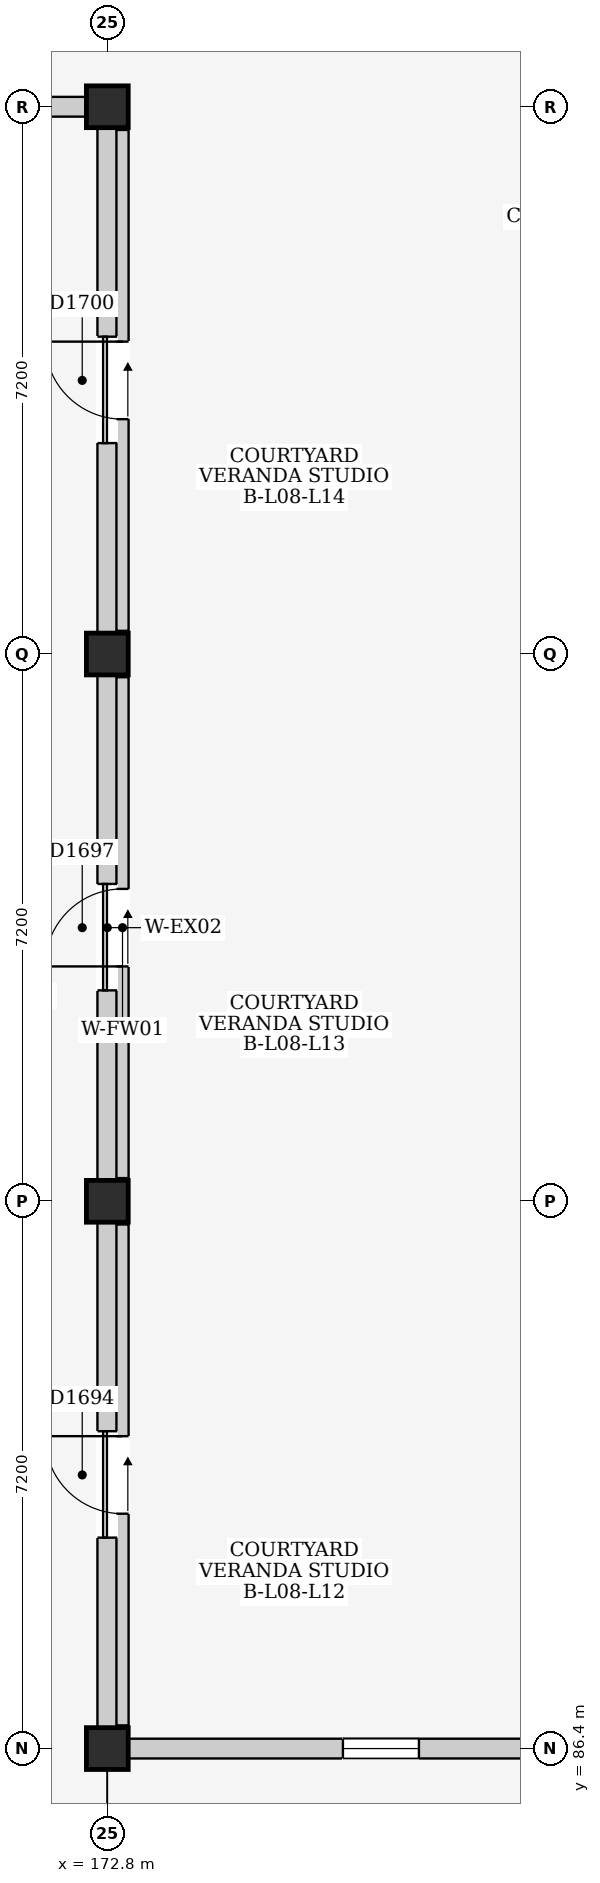
"""IFC4 building model, lengths in metres.
Left out: names, types, materials, properties, quantities, classifications, styles, units other than length and angle.
Written with IfcOpenShell. Run it as: python <this file> out.ifc"""

import sys

from ifc_helpers import new_model, si_unit, direction, frame, frame_2d, origin, origin_2d, place, context, subcontext, project, spatial, rectangle, extrude, element, fill, save


model = new_model("IFC4")
c1 = context("Model", 3, precision=1e-05, world=origin(), true_north=direction((0.0, 1.0)))
c2 = subcontext(c1, "Body", "Model", "MODEL_VIEW")
j1 = project(units=[si_unit("LENGTHUNIT", "METRE"), si_unit("PLANEANGLEUNIT", "RADIAN")], contexts=[c1])
p1 = place(None, origin())
s1 = spatial("IfcSite", under=j1, at=p1, CompositionType="ELEMENT")
p2 = place(p1, origin())
s2 = spatial("IfcBuilding", under=s1, at=p2, CompositionType="ELEMENT")
p3 = place(p2, frame((0.0, 0.0, 28.3)))
s3 = spatial("IfcBuildingStorey", under=s2, at=p3, CompositionType="ELEMENT", Elevation=28.3)
for number, where, z_axis, x_axis in (
    (1, (172.8, 86.4, 0.0), (0.0, 0.0, 1.0), (1.0, 0.0, 0.0)),
    (2, (172.8, 93.6, 0.0), (0.0, 0.0, 1.0), (1.0, 0.0, 0.0)),
    (3, (172.8, 100.8, 0.0), (0.0, 0.0, 1.0), (1.0, 0.0, 0.0)),
    (4, (172.8, 108.0, 0.0), (0.0, 0.0, 1.0), (1.0, 0.0, 0.0)),
):
    element("IfcColumn", number, at=place(p3, frame(where, z_axis=z_axis, x_axis=x_axis)), inside=s3, PredefinedType="COLUMN", context=c2, shape_type="SweptSolid", body=[
        extrude(rectangle(XDim=0.55, YDim=0.55, at=origin_2d()), origin(), (0.0, 0.0, 1.0), 3.2),
    ])
p4 = place(p3, frame((165.875, 108.0, 0.0), z_axis=(0.0, 0.0, 1.0), x_axis=(1.0, 0.0, 0.0)))
e5 = element("IfcWall", 5, at=p4, inside=s3, PredefinedType="ELEMENTEDWALL", context=c2, shape_type="SweptSolid", body=[
    extrude(rectangle(XDim=6.65, YDim=0.26, at=frame_2d((3.325, 0.0))), origin(), (0.0, 0.0, 1.0), 2.335),
])
p5 = place(p4, frame((2.825, 0.0, 1.2)))
e6 = element("IfcOpeningElement", 6, at=p5, cuts=e5, PredefinedType="OPENING", context=c2, shape_type="SweptSolid", body=[
    extrude(rectangle(XDim=1.0, YDim=0.9, at=frame_2d((0.5, 0.45))), frame((0.0, 0.145, 0.0), z_axis=(0.0, -1.0, 0.0), x_axis=(1.0, 0.0, 0.0)), (0.0, 0.0, 1.0), 0.29),
])
p6 = place(p3, frame((173.075, 86.4, 0.0), z_axis=(0.0, 0.0, 1.0), x_axis=(1.0, 0.0, 0.0)))
e7 = element("IfcWall", 7, at=p6, inside=s3, PredefinedType="ELEMENTEDWALL", context=c2, shape_type="SweptSolid", body=[
    extrude(rectangle(XDim=6.65, YDim=0.26, at=frame_2d((3.325, 0.0))), origin(), (0.0, 0.0, 1.0), 2.335),
])
p7 = place(p6, frame((2.825, 0.0, 1.1)))
e8 = element("IfcOpeningElement", 8, at=p7, cuts=e7, PredefinedType="OPENING", context=c2, shape_type="SweptSolid", body=[
    extrude(rectangle(XDim=1.0, YDim=0.9, at=frame_2d((0.5, 0.45))), frame((0.0, 0.145, 0.0), z_axis=(0.0, -1.0, 0.0), x_axis=(1.0, 0.0, 0.0)), (0.0, 0.0, 1.0), 0.29),
])
p8 = place(p3, frame((172.8, 86.675, 0.0), z_axis=(0.0, 0.0, 1.0), x_axis=(0.0, 1.0, 0.0)))
e9 = element("IfcWall", 9, at=p8, inside=s3, PredefinedType="ELEMENTEDWALL", context=c2, shape_type="SweptSolid", body=[
    extrude(rectangle(XDim=6.65, YDim=0.26, at=frame_2d((3.325, 0.0))), origin(), (0.0, 0.0, 1.0), 2.435),
])
p9 = place(p8, frame((2.5, 0.0, 0.0)))
e10 = element("IfcOpeningElement", 10, at=p9, cuts=e9, PredefinedType="OPENING", context=c2, shape_type="SweptSolid", body=[
    extrude(rectangle(XDim=1.4, YDim=2.1, at=frame_2d((0.7, 1.05))), frame((0.0, 0.145, 0.0), z_axis=(0.0, -1.0, 0.0), x_axis=(1.0, 0.0, 0.0)), (0.0, 0.0, 1.0), 0.29),
])
p10 = place(p3, frame((172.8, 93.875, 0.0), z_axis=(0.0, 0.0, 1.0), x_axis=(0.0, 1.0, 0.0)))
e11 = element("IfcWall", 11, at=p10, inside=s3, PredefinedType="ELEMENTEDWALL", context=c2, shape_type="SweptSolid", body=[
    extrude(rectangle(XDim=6.65, YDim=0.26, at=frame_2d((3.325, 0.0))), origin(), (0.0, 0.0, 1.0), 2.435),
])
p11 = place(p10, frame((2.5, 0.0, 0.0)))
e12 = element("IfcOpeningElement", 12, at=p11, cuts=e11, PredefinedType="OPENING", context=c2, shape_type="SweptSolid", body=[
    extrude(rectangle(XDim=1.4, YDim=2.1, at=frame_2d((0.7, 1.05))), frame((0.0, 0.145, 0.0), z_axis=(0.0, -1.0, 0.0), x_axis=(1.0, 0.0, 0.0)), (0.0, 0.0, 1.0), 0.29),
])
p12 = place(p3, frame((172.8, 101.075, 0.0), z_axis=(0.0, 0.0, 1.0), x_axis=(0.0, 1.0, 0.0)))
e13 = element("IfcWall", 13, at=p12, inside=s3, PredefinedType="ELEMENTEDWALL", context=c2, shape_type="SweptSolid", body=[
    extrude(rectangle(XDim=6.65, YDim=0.26, at=frame_2d((3.325, 0.0))), origin(), (0.0, 0.0, 1.0), 2.435),
])
p13 = place(p12, frame((2.5, 0.0, 0.0)))
e14 = element("IfcOpeningElement", 14, at=p13, cuts=e13, PredefinedType="OPENING", context=c2, shape_type="SweptSolid", body=[
    extrude(rectangle(XDim=1.4, YDim=2.1, at=frame_2d((0.7, 1.05))), frame((0.0, 0.145, 0.0), z_axis=(0.0, -1.0, 0.0), x_axis=(1.0, 0.0, 0.0)), (0.0, 0.0, 1.0), 0.29),
])
p14 = place(p3, frame((173.0, 86.705, 0.0), z_axis=(0.0, 0.0, 1.0), x_axis=(0.0, 1.0, 0.0)))
e15 = element("IfcWall", 15, at=p14, inside=s3, PredefinedType="PARTITIONING", context=c2, shape_type="SweptSolid", body=[
    extrude(rectangle(XDim=6.59, YDim=0.16, at=frame_2d((3.295, 0.0))), origin(), (0.0, 0.0, 1.0), 2.95),
])
p15 = place(p14, frame((2.785, 0.0, 0.0)))
e16 = element("IfcOpeningElement", 16, at=p15, cuts=e15, PredefinedType="OPENING", context=c2, shape_type="SweptSolid", body=[
    extrude(rectangle(XDim=1.02, YDim=2.18, at=frame_2d((0.51, 1.09))), frame((0.0, 0.095, 0.0), z_axis=(0.0, -1.0, 0.0), x_axis=(1.0, 0.0, 0.0)), (0.0, 0.0, 1.0), 0.19),
])
p16 = place(p3, frame((173.0, 93.905, 0.0), z_axis=(0.0, 0.0, 1.0), x_axis=(0.0, 1.0, 0.0)))
e17 = element("IfcWall", 17, at=p16, inside=s3, PredefinedType="PARTITIONING", context=c2, shape_type="SweptSolid", body=[
    extrude(rectangle(XDim=6.59, YDim=0.16, at=frame_2d((3.295, 0.0))), origin(), (0.0, 0.0, 1.0), 2.95),
])
p17 = place(p16, frame((2.785, 0.0, 0.0)))
e18 = element("IfcOpeningElement", 18, at=p17, cuts=e17, PredefinedType="OPENING", context=c2, shape_type="SweptSolid", body=[
    extrude(rectangle(XDim=1.02, YDim=2.18, at=frame_2d((0.51, 1.09))), frame((0.0, 0.095, 0.0), z_axis=(0.0, -1.0, 0.0), x_axis=(1.0, 0.0, 0.0)), (0.0, 0.0, 1.0), 0.19),
])
p18 = place(p3, frame((173.0, 101.105, 0.0), z_axis=(0.0, 0.0, 1.0), x_axis=(0.0, 1.0, 0.0)))
e19 = element("IfcWall", 19, at=p18, inside=s3, PredefinedType="PARTITIONING", context=c2, shape_type="SweptSolid", body=[
    extrude(rectangle(XDim=6.59, YDim=0.16, at=frame_2d((3.295, 0.0))), origin(), (0.0, 0.0, 1.0), 2.95),
])
p19 = place(p18, frame((2.785, 0.0, 0.0)))
e20 = element("IfcOpeningElement", 20, at=p19, cuts=e19, PredefinedType="OPENING", context=c2, shape_type="SweptSolid", body=[
    extrude(rectangle(XDim=1.02, YDim=2.18, at=frame_2d((0.51, 1.09))), frame((0.0, 0.095, 0.0), z_axis=(0.0, -1.0, 0.0), x_axis=(1.0, 0.0, 0.0)), (0.0, 0.0, 1.0), 0.19),
])
p20 = place(p7, origin())
e21 = element("IfcWindow", 21, at=p20, inside=s3, PartitioningType="SINGLE_PANEL", PredefinedType="WINDOW", context=c2, shape_type="SweptSolid", body=[
    extrude(rectangle(XDim=1.0, YDim=0.9, at=frame_2d((0.5, 0.45))), frame((0.0, 0.03, 0.0), z_axis=(0.0, -1.0, 0.0), x_axis=(1.0, 0.0, 0.0)), (0.0, 0.0, 1.0), 0.06),
])
fill(e8, e21)
p21 = place(p9, frame((1.4, 0.0, 0.0), z_axis=(0.0, 0.0, 1.0), x_axis=(-1.0, 0.0, 0.0)))
e22 = element("IfcDoor", 22, at=p21, inside=s3, OperationType="SLIDING_TO_RIGHT", PredefinedType="DOOR", context=c2, shape_type="SweptSolid", body=[
    extrude(rectangle(XDim=1.4, YDim=2.1, at=frame_2d((0.7, 1.05))), frame((0.0, 0.025, 0.0), z_axis=(0.0, -1.0, 0.0), x_axis=(1.0, 0.0, 0.0)), (0.0, 0.0, 1.0), 0.05),
])
fill(e10, e22)
p22 = place(p11, frame((1.4, 0.0, 0.0), z_axis=(0.0, 0.0, 1.0), x_axis=(-1.0, 0.0, 0.0)))
e23 = element("IfcDoor", 23, at=p22, inside=s3, OperationType="SLIDING_TO_RIGHT", PredefinedType="DOOR", context=c2, shape_type="SweptSolid", body=[
    extrude(rectangle(XDim=1.4, YDim=2.1, at=frame_2d((0.7, 1.05))), frame((0.0, 0.025, 0.0), z_axis=(0.0, -1.0, 0.0), x_axis=(1.0, 0.0, 0.0)), (0.0, 0.0, 1.0), 0.05),
])
fill(e12, e23)
p23 = place(p13, frame((1.4, 0.0, 0.0), z_axis=(0.0, 0.0, 1.0), x_axis=(-1.0, 0.0, 0.0)))
e24 = element("IfcDoor", 24, at=p23, inside=s3, OperationType="SLIDING_TO_RIGHT", PredefinedType="DOOR", context=c2, shape_type="SweptSolid", body=[
    extrude(rectangle(XDim=1.4, YDim=2.1, at=frame_2d((0.7, 1.05))), frame((0.0, 0.025, 0.0), z_axis=(0.0, -1.0, 0.0), x_axis=(1.0, 0.0, 0.0)), (0.0, 0.0, 1.0), 0.05),
])
fill(e14, e24)
p24 = place(p15, origin())
e25 = element("IfcDoor", 25, at=p24, inside=s3, OperationType="SINGLE_SWING_RIGHT", PredefinedType="DOOR", context=c2, shape_type="SweptSolid", body=[
    extrude(rectangle(XDim=1.02, YDim=2.18, at=frame_2d((0.51, 1.09))), frame((0.0, 0.025, 0.0), z_axis=(0.0, -1.0, 0.0), x_axis=(1.0, 0.0, 0.0)), (0.0, 0.0, 1.0), 0.05),
])
fill(e16, e25)
p25 = place(p17, origin())
e26 = element("IfcDoor", 26, at=p25, inside=s3, OperationType="SINGLE_SWING_LEFT", PredefinedType="DOOR", context=c2, shape_type="SweptSolid", body=[
    extrude(rectangle(XDim=1.02, YDim=2.18, at=frame_2d((0.51, 1.09))), frame((0.0, 0.025, 0.0), z_axis=(0.0, -1.0, 0.0), x_axis=(1.0, 0.0, 0.0)), (0.0, 0.0, 1.0), 0.05),
])
fill(e18, e26)
p26 = place(p19, origin())
e27 = element("IfcDoor", 27, at=p26, inside=s3, OperationType="SINGLE_SWING_RIGHT", PredefinedType="DOOR", context=c2, shape_type="SweptSolid", body=[
    extrude(rectangle(XDim=1.02, YDim=2.18, at=frame_2d((0.51, 1.09))), frame((0.0, 0.025, 0.0), z_axis=(0.0, -1.0, 0.0), x_axis=(1.0, 0.0, 0.0)), (0.0, 0.0, 1.0), 0.05),
])
fill(e20, e27)
save(model, sys.argv[1])
